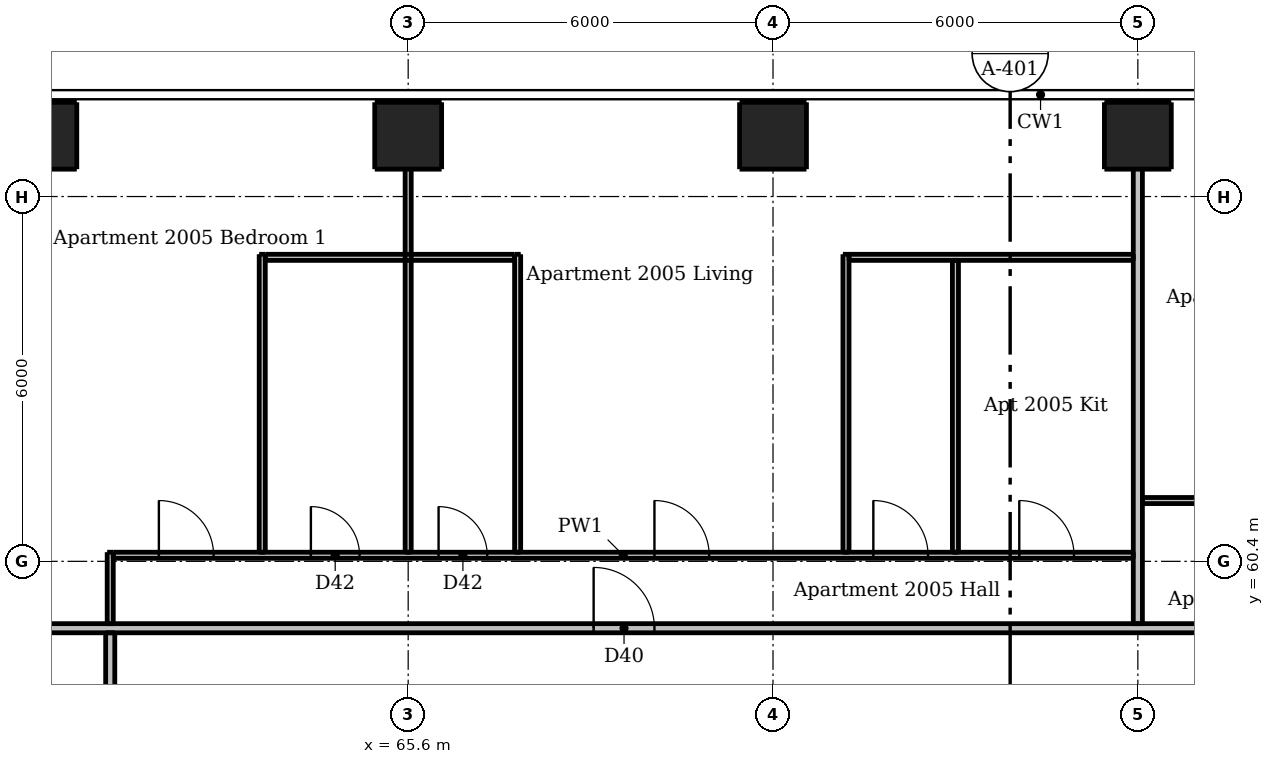
"""IFC4 building model, lengths in metres.
Left out: names, types, materials, properties, quantities, classifications, styles, units other than length and angle.
Written with IfcOpenShell. Run it as: python <this file> out.ifc"""

import sys

from ifc_helpers import new_model, si_unit, direction, frame, frame_2d, origin, origin_2d, place, context, subcontext, project, spatial, rectangle, extrude, element, fill, save


model = new_model("IFC4")
c1 = context("Model", 3, precision=1e-05, world=origin(), true_north=direction((0.0, 1.0)))
c2 = subcontext(c1, "Body", "Model", "MODEL_VIEW")
j1 = project(units=[si_unit("LENGTHUNIT", "METRE"), si_unit("PLANEANGLEUNIT", "RADIAN")], contexts=[c1])
p1 = place(None, origin())
s1 = spatial("IfcSite", under=j1, at=p1, CompositionType="ELEMENT")
p2 = place(p1, origin())
s2 = spatial("IfcBuilding", under=s1, at=p2, CompositionType="ELEMENT")
p3 = place(p2, frame((0.0, 0.0, 78.7)))
s3 = spatial("IfcBuildingStorey", under=s2, at=p3, CompositionType="ELEMENT", Elevation=78.7)
for number, where, z_axis, x_axis in (
    (1, (59.6, 67.4, 0.0), (0.0, 0.0, 1.0), (1.0, 0.0, 0.0)),
    (2, (65.6, 67.4, 0.0), (0.0, 0.0, 1.0), (1.0, 0.0, 0.0)),
    (3, (71.6, 67.4, 0.0), (0.0, 0.0, 1.0), (1.0, 0.0, 0.0)),
    (4, (77.6, 67.4, 0.0), (0.0, 0.0, 1.0), (1.0, 0.0, 0.0)),
):
    element("IfcColumn", number, at=place(p3, frame(where, z_axis=z_axis, x_axis=x_axis)), inside=s3, PredefinedType="COLUMN", context=c2, shape_type="SweptSolid", body=[
        extrude(rectangle(XDim=1.1, YDim=1.1, at=origin_2d()), origin(), (0.0, 0.0, 1.0), 3.05),
    ])
p4 = place(p3, frame((60.7, 59.375, 0.0), z_axis=(0.0, 0.0, 1.0), x_axis=(0.0, 1.0, 0.0)))
e5 = element("IfcWall", 5, at=p4, inside=s3, PredefinedType="PARTITIONING", context=c2, shape_type="SweptSolid", body=[
    extrude(rectangle(XDim=1.175, YDim=0.1, at=frame_2d((0.587, 0.0))), origin(), (0.0, 0.0, 1.0), 3.05),
])
p5 = place(p3, frame((63.2, 60.55, 0.0), z_axis=(0.0, 0.0, 1.0), x_axis=(0.0, 1.0, 0.0)))
e6 = element("IfcWall", 6, at=p5, inside=s3, PredefinedType="PARTITIONING", context=c2, shape_type="SweptSolid", body=[
    extrude(rectangle(XDim=4.9, YDim=0.1, at=frame_2d((2.45, 0.0))), origin(), (0.0, 0.0, 1.0), 3.05),
])
p6 = place(p3, frame((65.6, 60.55, 0.0), z_axis=(0.0, 0.0, 1.0), x_axis=(0.0, 1.0, 0.0)))
e7 = element("IfcWall", 7, at=p6, inside=s3, PredefinedType="PARTITIONING", context=c2, shape_type="SweptSolid", body=[
    extrude(rectangle(XDim=7.45, YDim=0.1, at=frame_2d((3.725, 0.0))), origin(), (0.0, 0.0, 1.0), 2.516),
])
for number, where, z_axis, x_axis in (
    (8, (67.4, 60.55, 0.0), (0.0, 0.0, 1.0), (0.0, 1.0, 0.0)),
    (9, (72.8, 60.55, 0.0), (0.0, 0.0, 1.0), (0.0, 1.0, 0.0)),
):
    element("IfcWall", number, at=place(p3, frame(where, z_axis=z_axis, x_axis=x_axis)), inside=s3, PredefinedType="PARTITIONING", context=c2, shape_type="SweptSolid", body=[
        extrude(rectangle(XDim=4.9, YDim=0.1, at=frame_2d((2.45, 0.0))), origin(), (0.0, 0.0, 1.0), 3.05),
    ])
p7 = place(p3, frame((74.6, 60.55, 0.0), z_axis=(0.0, 0.0, 1.0), x_axis=(0.0, 1.0, 0.0)))
e10 = element("IfcWall", 10, at=p7, inside=s3, PredefinedType="PARTITIONING", context=c2, shape_type="SweptSolid", body=[
    extrude(rectangle(XDim=4.8, YDim=0.1, at=frame_2d((2.4, 0.0))), origin(), (0.0, 0.0, 1.0), 3.05),
])
p8 = place(p3, frame((63.25, 65.4, 0.0), z_axis=(0.0, 0.0, 1.0), x_axis=(1.0, 0.0, 0.0)))
e11 = element("IfcWall", 11, at=p8, inside=s3, PredefinedType="PARTITIONING", context=c2, shape_type="SweptSolid", body=[
    extrude(rectangle(XDim=4.1, YDim=0.1, at=frame_2d((2.05, 0.0))), origin(), (0.0, 0.0, 1.0), 3.05),
])
p9 = place(p3, frame((72.85, 65.4, 0.0), z_axis=(0.0, 0.0, 1.0), x_axis=(1.0, 0.0, 0.0)))
e12 = element("IfcWall", 12, at=p9, inside=s3, PredefinedType="PARTITIONING", context=c2, shape_type="SweptSolid", body=[
    extrude(rectangle(XDim=4.675, YDim=0.1, at=frame_2d((2.337, 0.0))), origin(), (0.0, 0.0, 1.0), 3.05),
])
p10 = place(p3, frame((83.55, 61.4, 0.0), z_axis=(0.0, 0.0, 1.0), x_axis=(-1.0, 0.0, 0.0)))
e13 = element("IfcWall", 13, at=p10, inside=s3, PredefinedType="PARTITIONING", context=c2, shape_type="SweptSolid", body=[
    extrude(rectangle(XDim=5.875, YDim=0.1, at=frame_2d((2.938, 0.0))), origin(), (0.0, 0.0, 1.0), 3.05),
])
p11 = place(p10, frame((3.75, 0.0, 0.0)))
e14 = element("IfcOpeningElement", 14, at=p11, cuts=e13, PredefinedType="OPENING", context=c2, shape_type="SweptSolid", body=[
    extrude(rectangle(XDim=0.8, YDim=2.1, at=frame_2d((0.4, 1.05))), frame((0.0, 0.06, 0.0), z_axis=(0.0, -1.0, 0.0), x_axis=(1.0, 0.0, 0.0)), (0.0, 0.0, 1.0), 0.12),
])
p12 = place(p3, frame((60.75, 60.5, 0.0), z_axis=(0.0, 0.0, 1.0), x_axis=(1.0, 0.0, 0.0)))
e15 = element("IfcWall", 15, at=p12, inside=s3, PredefinedType="PARTITIONING", context=c2, shape_type="SweptSolid", body=[
    extrude(rectangle(XDim=16.775, YDim=0.1, at=frame_2d((8.387, 0.0))), origin(), (0.0, 0.0, 1.0), 3.05),
])
p13 = place(p12, frame((8.9, 0.0, 0.0)))
e16 = element("IfcOpeningElement", 16, at=p13, cuts=e15, PredefinedType="OPENING", context=c2, shape_type="SweptSolid", body=[
    extrude(rectangle(XDim=0.9, YDim=2.1, at=frame_2d((0.45, 1.05))), frame((0.0, 0.06, 0.0), z_axis=(0.0, -1.0, 0.0), x_axis=(1.0, 0.0, 0.0)), (0.0, 0.0, 1.0), 0.12),
])
p14 = place(p12, frame((14.9, 0.0, 0.0)))
e17 = element("IfcOpeningElement", 17, at=p14, cuts=e15, PredefinedType="OPENING", context=c2, shape_type="SweptSolid", body=[
    extrude(rectangle(XDim=0.9, YDim=2.1, at=frame_2d((0.45, 1.05))), frame((0.0, 0.06, 0.0), z_axis=(0.0, -1.0, 0.0), x_axis=(1.0, 0.0, 0.0)), (0.0, 0.0, 1.0), 0.12),
])
p15 = place(p12, frame((12.5, 0.0, 0.0)))
e18 = element("IfcOpeningElement", 18, at=p15, cuts=e15, PredefinedType="OPENING", context=c2, shape_type="SweptSolid", body=[
    extrude(rectangle(XDim=0.9, YDim=2.1, at=frame_2d((0.45, 1.05))), frame((0.0, 0.06, 0.0), z_axis=(0.0, -1.0, 0.0), x_axis=(1.0, 0.0, 0.0)), (0.0, 0.0, 1.0), 0.12),
])
p16 = place(p12, frame((5.35, 0.0, 0.0)))
e19 = element("IfcOpeningElement", 19, at=p16, cuts=e15, PredefinedType="OPENING", context=c2, shape_type="SweptSolid", body=[
    extrude(rectangle(XDim=0.8, YDim=2.1, at=frame_2d((0.4, 1.05))), frame((0.0, 0.06, 0.0), z_axis=(0.0, -1.0, 0.0), x_axis=(1.0, 0.0, 0.0)), (0.0, 0.0, 1.0), 0.12),
])
p17 = place(p12, frame((0.75, 0.0, 0.0)))
e20 = element("IfcOpeningElement", 20, at=p17, cuts=e15, PredefinedType="OPENING", context=c2, shape_type="SweptSolid", body=[
    extrude(rectangle(XDim=0.9, YDim=2.1, at=frame_2d((0.45, 1.05))), frame((0.0, 0.06, 0.0), z_axis=(0.0, -1.0, 0.0), x_axis=(1.0, 0.0, 0.0)), (0.0, 0.0, 1.0), 0.12),
])
p18 = place(p12, frame((3.25, 0.0, 0.0)))
e21 = element("IfcOpeningElement", 21, at=p18, cuts=e15, PredefinedType="OPENING", context=c2, shape_type="SweptSolid", body=[
    extrude(rectangle(XDim=0.8, YDim=2.1, at=frame_2d((0.4, 1.05))), frame((0.0, 0.06, 0.0), z_axis=(0.0, -1.0, 0.0), x_axis=(1.0, 0.0, 0.0)), (0.0, 0.0, 1.0), 0.12),
])
p19 = place(p3, frame((60.7, 30.325, 0.0), z_axis=(0.0, 0.0, 1.0), x_axis=(0.0, 1.0, 0.0)))
e22 = element("IfcWall", 22, at=p19, inside=s3, PredefinedType="PARTITIONING", context=c2, shape_type="SweptSolid", body=[
    extrude(rectangle(XDim=28.9, YDim=0.15, at=frame_2d((14.45, 0.0))), origin(), (0.0, 0.0, 1.0), 3.05),
])
p20 = place(p19, frame((9.225, 0.0, 0.0)))
e23 = element("IfcOpeningElement", 23, at=p20, cuts=e22, PredefinedType="OPENING", context=c2, shape_type="SweptSolid", body=[
    extrude(rectangle(XDim=1.0, YDim=2.1, at=frame_2d((0.5, 1.05))), frame((0.0, 0.085, 0.0), z_axis=(0.0, -1.0, 0.0), x_axis=(1.0, 0.0, 0.0)), (0.0, 0.0, 1.0), 0.17),
])
p21 = place(p19, frame((26.025, 0.0, 0.0)))
e24 = element("IfcOpeningElement", 24, at=p21, cuts=e22, PredefinedType="OPENING", context=c2, shape_type="SweptSolid", body=[
    extrude(rectangle(XDim=1.0, YDim=2.1, at=frame_2d((0.5, 1.05))), frame((0.0, 0.085, 0.0), z_axis=(0.0, -1.0, 0.0), x_axis=(1.0, 0.0, 0.0)), (0.0, 0.0, 1.0), 0.17),
])
p22 = place(p3, frame((77.6, 59.375, 0.0), z_axis=(0.0, 0.0, 1.0), x_axis=(0.0, 1.0, 0.0)))
e25 = element("IfcWall", 25, at=p22, inside=s3, PredefinedType="PARTITIONING", context=c2, shape_type="SweptSolid", body=[
    extrude(rectangle(XDim=8.625, YDim=0.15, at=frame_2d((4.312, 0.0))), origin(), (0.0, 0.0, 1.0), 2.516),
])
p23 = place(p3, frame((59.675, 59.3, 0.0), z_axis=(0.0, 0.0, 1.0), x_axis=(1.0, 0.0, 0.0)))
e26 = element("IfcWall", 26, at=p23, inside=s3, PredefinedType="PARTITIONING", context=c2, shape_type="SweptSolid", body=[
    extrude(rectangle(XDim=28.55, YDim=0.15, at=frame_2d((14.275, 0.0))), origin(), (0.0, 0.0, 1.0), 3.05),
])
p24 = place(p23, frame((8.975, 0.0, 0.0)))
e27 = element("IfcOpeningElement", 27, at=p24, cuts=e26, PredefinedType="OPENING", context=c2, shape_type="SweptSolid", body=[
    extrude(rectangle(XDim=1.0, YDim=2.1, at=frame_2d((0.5, 1.05))), frame((0.0, 0.085, 0.0), z_axis=(0.0, -1.0, 0.0), x_axis=(1.0, 0.0, 0.0)), (0.0, 0.0, 1.0), 0.17),
])
p25 = place(p23, frame((25.775, 0.0, 0.0)))
e28 = element("IfcOpeningElement", 28, at=p25, cuts=e26, PredefinedType="OPENING", context=c2, shape_type="SweptSolid", body=[
    extrude(rectangle(XDim=1.0, YDim=2.1, at=frame_2d((0.5, 1.05))), frame((0.0, 0.085, 0.0), z_axis=(0.0, -1.0, 0.0), x_axis=(1.0, 0.0, 0.0)), (0.0, 0.0, 1.0), 0.17),
])
p26 = place(p24, origin())
e29 = element("IfcDoor", 29, at=p26, inside=s3, OperationType="SINGLE_SWING_LEFT", PredefinedType="DOOR", context=c2, shape_type="SweptSolid", body=[
    extrude(rectangle(XDim=1.0, YDim=2.1, at=frame_2d((0.5, 1.05))), frame((0.0, 0.025, 0.0), z_axis=(0.0, -1.0, 0.0), x_axis=(1.0, 0.0, 0.0)), (0.0, 0.0, 1.0), 0.05),
])
fill(e27, e29)
p27 = place(p13, origin())
e30 = element("IfcDoor", 30, at=p27, inside=s3, OperationType="SINGLE_SWING_LEFT", PredefinedType="DOOR", context=c2, shape_type="SweptSolid", body=[
    extrude(rectangle(XDim=0.9, YDim=2.1, at=frame_2d((0.45, 1.05))), frame((0.0, 0.025, 0.0), z_axis=(0.0, -1.0, 0.0), x_axis=(1.0, 0.0, 0.0)), (0.0, 0.0, 1.0), 0.05),
])
fill(e16, e30)
p28 = place(p14, origin())
e31 = element("IfcDoor", 31, at=p28, inside=s3, OperationType="SINGLE_SWING_LEFT", PredefinedType="DOOR", context=c2, shape_type="SweptSolid", body=[
    extrude(rectangle(XDim=0.9, YDim=2.1, at=frame_2d((0.45, 1.05))), frame((0.0, 0.025, 0.0), z_axis=(0.0, -1.0, 0.0), x_axis=(1.0, 0.0, 0.0)), (0.0, 0.0, 1.0), 0.05),
])
fill(e17, e31)
p29 = place(p15, origin())
e32 = element("IfcDoor", 32, at=p29, inside=s3, OperationType="SINGLE_SWING_LEFT", PredefinedType="DOOR", context=c2, shape_type="SweptSolid", body=[
    extrude(rectangle(XDim=0.9, YDim=2.1, at=frame_2d((0.45, 1.05))), frame((0.0, 0.025, 0.0), z_axis=(0.0, -1.0, 0.0), x_axis=(1.0, 0.0, 0.0)), (0.0, 0.0, 1.0), 0.05),
])
fill(e18, e32)
p30 = place(p16, origin())
e33 = element("IfcDoor", 33, at=p30, inside=s3, OperationType="SINGLE_SWING_LEFT", PredefinedType="DOOR", context=c2, shape_type="SweptSolid", body=[
    extrude(rectangle(XDim=0.8, YDim=2.1, at=frame_2d((0.4, 1.05))), frame((0.0, 0.025, 0.0), z_axis=(0.0, -1.0, 0.0), x_axis=(1.0, 0.0, 0.0)), (0.0, 0.0, 1.0), 0.05),
])
fill(e19, e33)
p31 = place(p17, origin())
e34 = element("IfcDoor", 34, at=p31, inside=s3, OperationType="SINGLE_SWING_LEFT", PredefinedType="DOOR", context=c2, shape_type="SweptSolid", body=[
    extrude(rectangle(XDim=0.9, YDim=2.1, at=frame_2d((0.45, 1.05))), frame((0.0, 0.025, 0.0), z_axis=(0.0, -1.0, 0.0), x_axis=(1.0, 0.0, 0.0)), (0.0, 0.0, 1.0), 0.05),
])
fill(e20, e34)
p32 = place(p18, origin())
e35 = element("IfcDoor", 35, at=p32, inside=s3, OperationType="SINGLE_SWING_LEFT", PredefinedType="DOOR", context=c2, shape_type="SweptSolid", body=[
    extrude(rectangle(XDim=0.8, YDim=2.1, at=frame_2d((0.4, 1.05))), frame((0.0, 0.025, 0.0), z_axis=(0.0, -1.0, 0.0), x_axis=(1.0, 0.0, 0.0)), (0.0, 0.0, 1.0), 0.05),
])
fill(e21, e35)
save(model, sys.argv[1])
